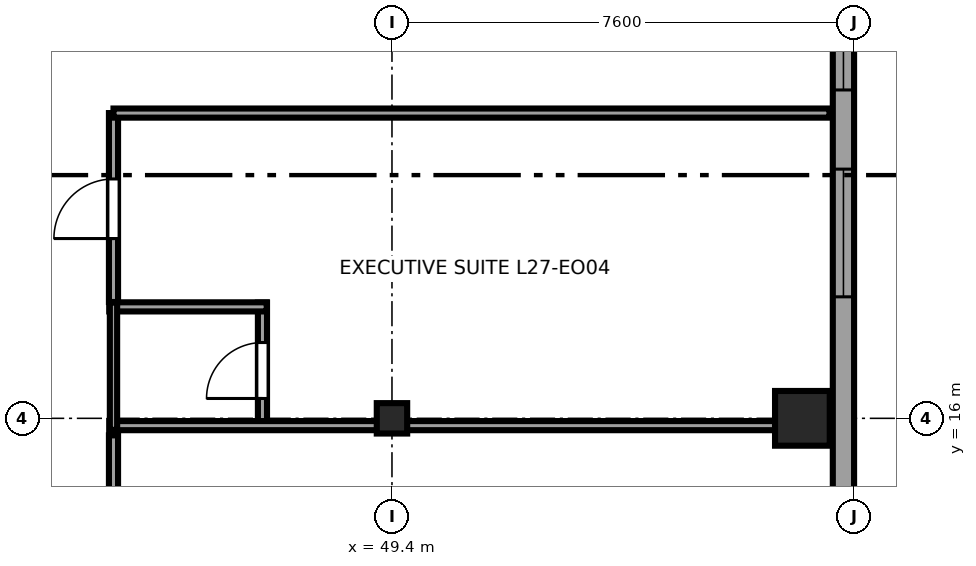
"""IFC4 building model, lengths in metres.
Left out: names, types, materials, properties, quantities, classifications, styles, units other than length and angle.
Written with IfcOpenShell. Run it as: python <this file> out.ifc"""

import sys

from ifc_helpers import new_model, si_unit, direction, frame, frame_2d, origin, origin_2d, place, context, subcontext, project, spatial, rectangle, i_section, extrude, source, transform, mapped, element, fill, save


model = new_model("IFC4")
c1 = context("Model", 3, precision=1e-05, world=origin(), true_north=direction((0.0, 1.0)))
c2 = subcontext(c1, "Body", "Model", "MODEL_VIEW")
j1 = project(units=[si_unit("LENGTHUNIT", "METRE"), si_unit("PLANEANGLEUNIT", "RADIAN")], contexts=[c1])
p1 = place(None, origin())
s1 = spatial("IfcSite", under=j1, at=p1, CompositionType="ELEMENT")
p2 = place(p1, origin())
s2 = spatial("IfcBuilding", under=s1, at=p2, CompositionType="ELEMENT")
p3 = place(p2, frame((0.0, 0.0, 108.0)))
s3 = spatial("IfcBuildingStorey", under=s2, at=p3, CompositionType="ELEMENT", Elevation=108.0)
m1 = source(origin(), c2, "Body", "SweptSolid", [
    extrude(i_section(OverallWidth=0.5, OverallDepth=0.5, WebThickness=0.022, FlangeThickness=0.034, at=origin_2d()), origin(), (0.0, 0.0, 1.0), 3.55),
])
p4 = place(p3, frame((49.4, 16.0, 0.0), z_axis=(0.0, 0.0, 1.0), x_axis=(1.0, 0.0, 0.0)))
e1 = element("IfcColumn", 1, at=p4, inside=s3, PredefinedType="COLUMN", context=c2, shape_type="MappedRepresentation", body=[
    mapped(m1, transform((0.0, 0.0, 0.0), x_axis=(1.0, 0.0, 0.0), y_axis=(0.0, 1.0, 0.0), z_axis=(0.0, 0.0, 1.0), scale=1.0)),
])
m2 = source(origin(), c2, "Body", "SweptSolid", [
    extrude(rectangle(XDim=0.9, YDim=0.9, at=origin_2d()), origin(), (0.0, 0.0, 1.0), 3.55),
])
p5 = place(p3, frame((56.15, 16.0, 0.0), z_axis=(0.0, 0.0, 1.0), x_axis=(1.0, 0.0, 0.0)))
e2 = element("IfcColumn", 2, at=p5, inside=s3, PredefinedType="COLUMN", context=c2, shape_type="MappedRepresentation", body=[
    mapped(m2, transform((0.0, 0.0, 0.0), x_axis=(1.0, 0.0, 0.0), y_axis=(0.0, 1.0, 0.0), z_axis=(0.0, 0.0, 1.0), scale=1.0)),
])
p6 = place(p3, frame((56.825, 4.617, 0.0), z_axis=(0.0, 0.0, 1.0), x_axis=(0.0, 1.0, 0.0)))
e3 = element("IfcWall", 3, at=p6, inside=s3, PredefinedType="SOLIDWALL", context=c2, shape_type="SweptSolid", body=[
    extrude(rectangle(XDim=36.766, YDim=0.35, at=frame_2d((18.383, 0.0))), origin(), (0.0, 0.0, 1.0), 3.37),
])
p7 = place(p6, frame((6.528, 0.0, 0.68)))
e4 = element("IfcOpeningElement", 4, at=p7, cuts=e3, PredefinedType="OPENING", context=c2, shape_type="SweptSolid", body=[
    extrude(rectangle(XDim=2.1, YDim=1.9, at=frame_2d((1.05, 0.95))), frame((0.0, 0.185, 0.0), z_axis=(0.0, -1.0, 0.0), x_axis=(1.0, 0.0, 0.0)), (0.0, 0.0, 1.0), 0.37),
])
p8 = place(p6, frame((13.381, 0.0, 0.68)))
e5 = element("IfcOpeningElement", 5, at=p8, cuts=e3, PredefinedType="OPENING", context=c2, shape_type="SweptSolid", body=[
    extrude(rectangle(XDim=2.1, YDim=1.9, at=frame_2d((1.05, 0.95))), frame((0.0, 0.185, 0.0), z_axis=(0.0, -1.0, 0.0), x_axis=(1.0, 0.0, 0.0)), (0.0, 0.0, 1.0), 0.37),
])
p9 = place(p6, frame((16.783, 0.0, 0.68)))
e6 = element("IfcOpeningElement", 6, at=p9, cuts=e3, PredefinedType="OPENING", context=c2, shape_type="SweptSolid", body=[
    extrude(rectangle(XDim=2.1, YDim=1.9, at=frame_2d((1.05, 0.95))), frame((0.0, 0.185, 0.0), z_axis=(0.0, -1.0, 0.0), x_axis=(1.0, 0.0, 0.0)), (0.0, 0.0, 1.0), 0.37),
])
p10 = place(p6, frame((25.236, 0.0, 0.68)))
e7 = element("IfcOpeningElement", 7, at=p10, cuts=e3, PredefinedType="OPENING", context=c2, shape_type="SweptSolid", body=[
    extrude(rectangle(XDim=2.1, YDim=1.9, at=frame_2d((1.05, 0.95))), frame((0.0, 0.185, 0.0), z_axis=(0.0, -1.0, 0.0), x_axis=(1.0, 0.0, 0.0)), (0.0, 0.0, 1.0), 0.37),
])
p11 = place(p6, frame((2.333, 0.0, 0.62)))
e8 = element("IfcOpeningElement", 8, at=p11, cuts=e3, PredefinedType="OPENING", context=c2, shape_type="SweptSolid", body=[
    extrude(rectangle(XDim=1.5, YDim=1.55, at=frame_2d((0.75, 0.775))), frame((0.0, 0.185, 0.0), z_axis=(0.0, -1.0, 0.0), x_axis=(1.0, 0.0, 0.0)), (0.0, 0.0, 1.0), 0.37),
])
p12 = place(p3, frame((47.27, 15.81, 0.0), z_axis=(0.0, 0.0, 1.0), x_axis=(0.0, 1.0, 0.0)))
e9 = element("IfcWall", 9, at=p12, inside=s3, PredefinedType="PARTITIONING", context=c2, shape_type="SweptSolid", body=[
    extrude(rectangle(XDim=2.093, YDim=0.15, at=frame_2d((1.046, 0.0))), origin(), (0.0, 0.0, 1.0), 3.37),
])
p13 = place(p12, frame((0.517, 0.0, 0.0)))
e10 = element("IfcOpeningElement", 10, at=p13, cuts=e9, PredefinedType="OPENING", context=c2, shape_type="SweptSolid", body=[
    extrude(rectangle(XDim=0.92, YDim=2.01, at=frame_2d((0.46, 1.005))), frame((0.0, 0.085, 0.0), z_axis=(0.0, -1.0, 0.0), x_axis=(1.0, 0.0, 0.0)), (0.0, 0.0, 1.0), 0.17),
])
p14 = place(p3, frame((44.75, 15.88, 0.0), z_axis=(0.0, 0.0, 1.0), x_axis=(1.0, 0.0, 0.0)))
e11 = element("IfcWall", 11, at=p14, inside=s3, PredefinedType="PARTITIONING", context=c2, shape_type="SweptSolid", body=[
    extrude(rectangle(XDim=11.845, YDim=0.15, at=frame_2d((5.922, 0.0))), origin(), (0.0, 0.0, 1.0), 2.748),
])
p15 = place(p3, frame((44.75, 17.833, 0.0), z_axis=(0.0, 0.0, 1.0), x_axis=(1.0, 0.0, 0.0)))
e12 = element("IfcWall", 12, at=p15, inside=s3, PredefinedType="PARTITIONING", context=c2, shape_type="SweptSolid", body=[
    extrude(rectangle(XDim=2.59, YDim=0.15, at=frame_2d((1.295, 0.0))), origin(), (0.0, 0.0, 1.0), 3.37),
])
p16 = place(p3, frame((44.82, 15.81, 0.0), z_axis=(0.0, 0.0, 1.0), x_axis=(0.0, 1.0, 0.0)))
e13 = element("IfcWall", 13, at=p16, inside=s3, PredefinedType="PLUMBINGWALL", context=c2, shape_type="SweptSolid", body=[
    extrude(rectangle(XDim=2.093, YDim=0.12, at=frame_2d((1.046, 0.0))), origin(), (0.0, 0.0, 1.0), 3.37),
])
p17 = place(p3, frame((44.82, 12.551, 0.0), z_axis=(0.0, 0.0, 1.0), x_axis=(0.0, 1.0, 0.0)))
e14 = element("IfcWall", 14, at=p17, inside=s3, PredefinedType="PARTITIONING", context=c2, shape_type="SweptSolid", body=[
    extrude(rectangle(XDim=3.169, YDim=0.15, at=frame_2d((1.584, 0.0))), origin(), (0.0, 0.0, 1.0), 3.37),
])
p18 = place(p17, frame((1.074, 0.0, 0.0)))
e15 = element("IfcOpeningElement", 15, at=p18, cuts=e14, PredefinedType="OPENING", context=c2, shape_type="SweptSolid", body=[
    extrude(rectangle(XDim=0.98, YDim=2.12, at=frame_2d((0.49, 1.06))), frame((0.0, 0.085, 0.0), z_axis=(0.0, -1.0, 0.0), x_axis=(1.0, 0.0, 0.0)), (0.0, 0.0, 1.0), 0.17),
])
p19 = place(p3, frame((44.82, 17.913, 0.0), z_axis=(0.0, 0.0, 1.0), x_axis=(0.0, 1.0, 0.0)))
e16 = element("IfcWall", 16, at=p19, inside=s3, PredefinedType="PARTITIONING", context=c2, shape_type="SweptSolid", body=[
    extrude(rectangle(XDim=3.107, YDim=0.15, at=frame_2d((1.553, 0.0))), origin(), (0.0, 0.0, 1.0), 3.37),
])
p20 = place(p19, frame((1.043, 0.0, 0.0)))
e17 = element("IfcOpeningElement", 17, at=p20, cuts=e16, PredefinedType="OPENING", context=c2, shape_type="SweptSolid", body=[
    extrude(rectangle(XDim=0.98, YDim=2.12, at=frame_2d((0.49, 1.06))), frame((0.0, 0.085, 0.0), z_axis=(0.0, -1.0, 0.0), x_axis=(1.0, 0.0, 0.0)), (0.0, 0.0, 1.0), 0.17),
])
p21 = place(p3, frame((44.82, 21.02, 0.0), z_axis=(0.0, 0.0, 1.0), x_axis=(1.0, 0.0, 0.0)))
e18 = element("IfcWall", 18, at=p21, inside=s3, PredefinedType="PARTITIONING", context=c2, shape_type="SweptSolid", body=[
    extrude(rectangle(XDim=11.775, YDim=0.15, at=frame_2d((5.887, 0.0))), origin(), (0.0, 0.0, 1.0), 3.37),
])
m3 = source(origin(), c2, "Body", "SweptSolid", [
    extrude(rectangle(XDim=2.1, YDim=1.9, at=frame_2d((1.05, 0.95))), frame((0.0, 0.09, 0.0), z_axis=(0.0, -1.0, 0.0), x_axis=(1.0, 0.0, 0.0)), (0.0, 0.0, 1.0), 0.06),
])
p22 = place(p8, origin())
e19 = element("IfcWindow", 19, at=p22, inside=s3, PartitioningType="TRIPLE_PANEL_HORIZONTAL", PredefinedType="WINDOW", context=c2, shape_type="MappedRepresentation", body=[
    mapped(m3, transform((0.0, 0.0, 0.0), x_axis=(1.0, 0.0, 0.0), y_axis=(0.0, 1.0, 0.0), z_axis=(0.0, 0.0, 1.0), scale=1.0)),
])
fill(e5, e19)
p23 = place(p9, origin())
e20 = element("IfcWindow", 20, at=p23, inside=s3, PartitioningType="TRIPLE_PANEL_HORIZONTAL", PredefinedType="WINDOW", context=c2, shape_type="MappedRepresentation", body=[
    mapped(m3, transform((0.0, 0.0, 0.0), x_axis=(1.0, 0.0, 0.0), y_axis=(0.0, 1.0, 0.0), z_axis=(0.0, 0.0, 1.0), scale=1.0)),
])
fill(e6, e20)
m4 = source(origin(), c2, "Body", "SweptSolid", [
    extrude(rectangle(XDim=0.92, YDim=2.01, at=frame_2d((0.46, 1.005))), frame((0.0, 0.025, 0.0), z_axis=(0.0, -1.0, 0.0), x_axis=(1.0, 0.0, 0.0)), (0.0, 0.0, 1.0), 0.05),
])
p24 = place(p13, origin())
e21 = element("IfcDoor", 21, at=p24, inside=s3, OperationType="SINGLE_SWING_LEFT", PredefinedType="DOOR", context=c2, shape_type="MappedRepresentation", body=[
    mapped(m4, transform((0.0, 0.0, 0.0), x_axis=(1.0, 0.0, 0.0), y_axis=(0.0, 1.0, 0.0), z_axis=(0.0, 0.0, 1.0), scale=1.0)),
])
fill(e10, e21)
m5 = source(origin(), c2, "Body", "SweptSolid", [
    extrude(rectangle(XDim=0.98, YDim=2.12, at=frame_2d((0.49, 1.06))), frame((0.0, 0.025, 0.0), z_axis=(0.0, -1.0, 0.0), x_axis=(1.0, 0.0, 0.0)), (0.0, 0.0, 1.0), 0.05),
])
p25 = place(p20, origin())
e22 = element("IfcDoor", 22, at=p25, inside=s3, OperationType="SINGLE_SWING_LEFT", PredefinedType="DOOR", context=c2, shape_type="MappedRepresentation", body=[
    mapped(m5, transform((0.0, 0.0, 0.0), x_axis=(1.0, 0.0, 0.0), y_axis=(0.0, 1.0, 0.0), z_axis=(0.0, 0.0, 1.0), scale=1.0)),
])
fill(e17, e22)
save(model, sys.argv[1])
